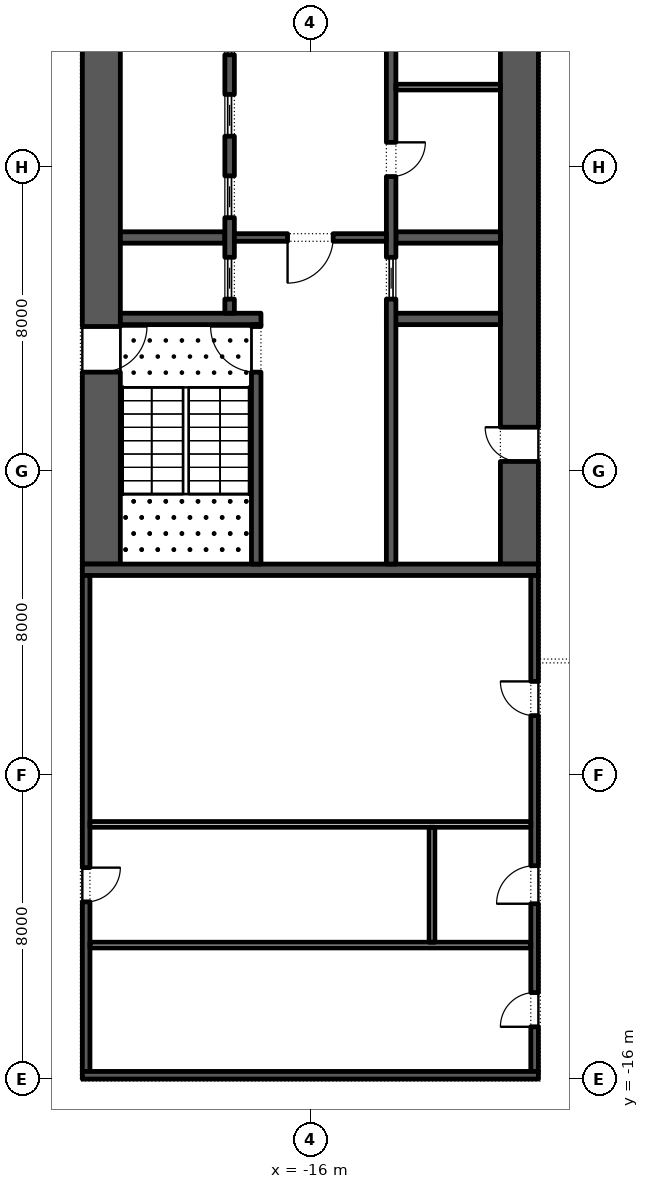
"""IFC4 building model, lengths in metres.
Left out: names, types, materials, properties, quantities, classifications, styles, units other than length and angle.
Written with IfcOpenShell. Run it as: python <this file> out.ifc"""

import sys

from ifc_helpers import new_model, si_unit, direction, frame, frame_2d, origin, place, context, subcontext, project, spatial, rectangle, extrude, element, fill, save


model = new_model("IFC4")
c1 = context("Model", 3, precision=1e-05, world=origin(), true_north=direction((0.0, 1.0)))
c2 = subcontext(c1, "Body", "Model", "MODEL_VIEW")
j1 = project(units=[si_unit("LENGTHUNIT", "METRE"), si_unit("PLANEANGLEUNIT", "RADIAN")], contexts=[c1])
p1 = place(None, origin())
s1 = spatial("IfcSite", under=j1, at=p1, CompositionType="ELEMENT")
p2 = place(p1, origin())
s2 = spatial("IfcBuilding", under=s1, at=p2, CompositionType="ELEMENT")
p3 = place(p2, frame((0.0, 0.0, 33.6)))
s3 = spatial("IfcBuildingStorey", under=s2, at=p3, CompositionType="ELEMENT", Elevation=33.6)
p4 = place(p3, frame((-21.5, -2.45, 0.0), z_axis=(0.0, 0.0, 1.0), x_axis=(0.0, 1.0, 0.0)))
e1 = element("IfcWall", 1, at=p4, inside=s3, PredefinedType="SHEAR", context=c2, shape_type="SweptSolid", body=[
    extrude(rectangle(XDim=27.9, YDim=1.0, at=frame_2d((13.95, 0.0))), origin(), (0.0, 0.0, 1.0), 5.8),
])
p5 = place(p4, frame((5.05, 0.0, 0.0)))
e2 = element("IfcOpeningElement", 2, at=p5, cuts=e1, PredefinedType="OPENING", context=c2, shape_type="SweptSolid", body=[
    extrude(rectangle(XDim=1.2, YDim=2.1, at=frame_2d((0.6, 1.05))), frame((0.0, 0.51, 0.0), z_axis=(0.0, -1.0, 0.0), x_axis=(1.0, 0.0, 0.0)), (0.0, 0.0, 1.0), 1.02),
])
p6 = place(p4, frame((21.65, 0.0, 0.0)))
e3 = element("IfcOpeningElement", 3, at=p6, cuts=e1, PredefinedType="OPENING", context=c2, shape_type="SweptSolid", body=[
    extrude(rectangle(XDim=1.2, YDim=2.1, at=frame_2d((0.6, 1.05))), frame((0.0, 0.51, 0.0), z_axis=(0.0, -1.0, 0.0), x_axis=(1.0, 0.0, 0.0)), (0.0, 0.0, 1.0), 1.02),
])
p7 = place(p3, frame((-10.5, -2.45, 0.0), z_axis=(0.0, 0.0, 1.0), x_axis=(0.0, 1.0, 0.0)))
e4 = element("IfcWall", 4, at=p7, inside=s3, PredefinedType="SHEAR", context=c2, shape_type="SweptSolid", body=[
    extrude(rectangle(XDim=27.9, YDim=1.0, at=frame_2d((13.95, 0.0))), origin(), (0.0, 0.0, 1.0), 5.8),
])
p8 = place(p7, frame((23.65, 0.0, 0.0)))
e5 = element("IfcOpeningElement", 5, at=p8, cuts=e4, PredefinedType="OPENING", context=c2, shape_type="SweptSolid", body=[
    extrude(rectangle(XDim=2.4, YDim=2.1, at=frame_2d((1.2, 1.05))), frame((0.0, 0.51, 0.0), z_axis=(0.0, -1.0, 0.0), x_axis=(1.0, 0.0, 0.0)), (0.0, 0.0, 1.0), 1.02),
])
p9 = place(p7, frame((2.7, 0.0, 0.0)))
e6 = element("IfcOpeningElement", 6, at=p9, cuts=e4, PredefinedType="OPENING", context=c2, shape_type="SweptSolid", body=[
    extrude(rectangle(XDim=0.9, YDim=2.1, at=frame_2d((0.45, 1.05))), frame((0.0, 0.51, 0.0), z_axis=(0.0, -1.0, 0.0), x_axis=(1.0, 0.0, 0.0)), (0.0, 0.0, 1.0), 1.02),
])
p10 = place(p3, frame((-22.0, -2.6, 0.0), z_axis=(0.0, 0.0, 1.0), x_axis=(1.0, 0.0, 0.0)))
e7 = element("IfcWall", 7, at=p10, inside=s3, PredefinedType="SHEAR", context=c2, shape_type="SweptSolid", body=[
    extrude(rectangle(XDim=12.0, YDim=0.3, at=frame_2d((6.0, 0.0))), origin(), (0.0, 0.0, 1.0), 5.8),
])
p11 = place(p3, frame((-21.0, 4.0, 0.0), z_axis=(0.0, 0.0, 1.0), x_axis=(1.0, 0.0, 0.0)))
e8 = element("IfcWall", 8, at=p11, inside=s3, PredefinedType="SHEAR", context=c2, shape_type="SweptSolid", body=[
    extrude(rectangle(XDim=3.7, YDim=0.3, at=frame_2d((1.85, 0.0))), origin(), (0.0, 0.0, 1.0), 5.8),
])
p12 = place(p3, frame((-17.425, -2.45, 0.0), z_axis=(0.0, 0.0, 1.0), x_axis=(0.0, 1.0, 0.0)))
e9 = element("IfcWall", 9, at=p12, inside=s3, PredefinedType="SHEAR", context=c2, shape_type="SweptSolid", body=[
    extrude(rectangle(XDim=6.3, YDim=0.25, at=frame_2d((3.15, 0.0))), origin(), (0.0, 0.0, 1.0), 5.8),
])
p13 = place(p12, frame((5.05, 0.0, 0.0)))
e10 = element("IfcOpeningElement", 10, at=p13, cuts=e9, PredefinedType="OPENING", context=c2, shape_type="SweptSolid", body=[
    extrude(rectangle(XDim=1.2, YDim=2.1, at=frame_2d((0.6, 1.05))), frame((0.0, 0.135, 0.0), z_axis=(0.0, -1.0, 0.0), x_axis=(1.0, 0.0, 0.0)), (0.0, 0.0, 1.0), 0.27),
])
p14 = place(p3, frame((-21.0, 6.143, 0.0), z_axis=(0.0, 0.0, 1.0), x_axis=(1.0, 0.0, 0.0)))
e11 = element("IfcWall", 11, at=p14, inside=s3, PredefinedType="SHEAR", context=c2, shape_type="SweptSolid", body=[
    extrude(rectangle(XDim=2.75, YDim=0.3, at=frame_2d((1.375, 0.0))), origin(), (0.0, 0.0, 1.0), 5.8),
])
p15 = place(p3, frame((-18.125, 4.15, 0.0), z_axis=(0.0, 0.0, 1.0), x_axis=(0.0, 1.0, 0.0)))
e12 = element("IfcWall", 12, at=p15, inside=s3, PredefinedType="SHEAR", context=c2, shape_type="SweptSolid", body=[
    extrude(rectangle(XDim=14.7, YDim=0.25, at=frame_2d((7.35, 0.0))), origin(), (0.0, 0.0, 1.0), 5.8),
])
p16 = place(p15, frame((0.371, 0.0, 0.0)))
e13 = element("IfcOpeningElement", 13, at=p16, cuts=e12, PredefinedType="OPENING", context=c2, shape_type="SweptSolid", body=[
    extrude(rectangle(XDim=1.1, YDim=2.1, at=frame_2d((0.55, 1.05))), frame((0.0, 0.135, 0.0), z_axis=(0.0, -1.0, 0.0), x_axis=(1.0, 0.0, 0.0)), (0.0, 0.0, 1.0), 0.27),
])
p17 = place(p15, frame((2.514, 0.0, 0.0)))
e14 = element("IfcOpeningElement", 14, at=p17, cuts=e12, PredefinedType="OPENING", context=c2, shape_type="SweptSolid", body=[
    extrude(rectangle(XDim=1.1, YDim=2.1, at=frame_2d((0.55, 1.05))), frame((0.0, 0.135, 0.0), z_axis=(0.0, -1.0, 0.0), x_axis=(1.0, 0.0, 0.0)), (0.0, 0.0, 1.0), 0.27),
])
p18 = place(p15, frame((4.657, 0.0, 0.0)))
e15 = element("IfcOpeningElement", 15, at=p18, cuts=e12, PredefinedType="OPENING", context=c2, shape_type="SweptSolid", body=[
    extrude(rectangle(XDim=1.1, YDim=2.1, at=frame_2d((0.55, 1.05))), frame((0.0, 0.135, 0.0), z_axis=(0.0, -1.0, 0.0), x_axis=(1.0, 0.0, 0.0)), (0.0, 0.0, 1.0), 0.27),
])
p19 = place(p15, frame((6.8, 0.0, 0.0)))
e16 = element("IfcOpeningElement", 16, at=p19, cuts=e12, PredefinedType="OPENING", context=c2, shape_type="SweptSolid", body=[
    extrude(rectangle(XDim=1.1, YDim=2.1, at=frame_2d((0.55, 1.05))), frame((0.0, 0.135, 0.0), z_axis=(0.0, -1.0, 0.0), x_axis=(1.0, 0.0, 0.0)), (0.0, 0.0, 1.0), 0.27),
])
p20 = place(p15, frame((8.943, 0.0, 0.0)))
e17 = element("IfcOpeningElement", 17, at=p20, cuts=e12, PredefinedType="OPENING", context=c2, shape_type="SweptSolid", body=[
    extrude(rectangle(XDim=1.1, YDim=2.1, at=frame_2d((0.55, 1.05))), frame((0.0, 0.135, 0.0), z_axis=(0.0, -1.0, 0.0), x_axis=(1.0, 0.0, 0.0)), (0.0, 0.0, 1.0), 0.27),
])
p21 = place(p15, frame((11.086, 0.0, 0.0)))
e18 = element("IfcOpeningElement", 18, at=p21, cuts=e12, PredefinedType="OPENING", context=c2, shape_type="SweptSolid", body=[
    extrude(rectangle(XDim=1.1, YDim=2.1, at=frame_2d((0.55, 1.05))), frame((0.0, 0.135, 0.0), z_axis=(0.0, -1.0, 0.0), x_axis=(1.0, 0.0, 0.0)), (0.0, 0.0, 1.0), 0.27),
])
p22 = place(p15, frame((13.229, 0.0, 0.0)))
e19 = element("IfcOpeningElement", 19, at=p22, cuts=e12, PredefinedType="OPENING", context=c2, shape_type="SweptSolid", body=[
    extrude(rectangle(XDim=1.1, YDim=2.1, at=frame_2d((0.55, 1.05))), frame((0.0, 0.135, 0.0), z_axis=(0.0, -1.0, 0.0), x_axis=(1.0, 0.0, 0.0)), (0.0, 0.0, 1.0), 0.27),
])
p23 = place(p3, frame((-14.0, 4.0, 0.0), z_axis=(0.0, 0.0, 1.0), x_axis=(1.0, 0.0, 0.0)))
e20 = element("IfcWall", 20, at=p23, inside=s3, PredefinedType="SHEAR", context=c2, shape_type="SweptSolid", body=[
    extrude(rectangle(XDim=3.0, YDim=0.3, at=frame_2d((1.5, 0.0))), origin(), (0.0, 0.0, 1.0), 5.8),
])
p24 = place(p3, frame((-13.75, 6.143, 0.0), z_axis=(0.0, 0.0, 1.0), x_axis=(1.0, 0.0, 0.0)))
e21 = element("IfcWall", 21, at=p24, inside=s3, PredefinedType="SHEAR", context=c2, shape_type="SweptSolid", body=[
    extrude(rectangle(XDim=2.75, YDim=0.3, at=frame_2d((1.375, 0.0))), origin(), (0.0, 0.0, 1.0), 5.8),
])
p25 = place(p3, frame((-13.875, -2.45, 0.0), z_axis=(0.0, 0.0, 1.0), x_axis=(0.0, 1.0, 0.0)))
e22 = element("IfcWall", 22, at=p25, inside=s3, PredefinedType="SHEAR", context=c2, shape_type="SweptSolid", body=[
    extrude(rectangle(XDim=21.3, YDim=0.25, at=frame_2d((10.65, 0.0))), origin(), (0.0, 0.0, 1.0), 5.8),
])
p26 = place(p25, frame((10.196, 0.0, 0.0)))
e23 = element("IfcOpeningElement", 23, at=p26, cuts=e22, PredefinedType="OPENING", context=c2, shape_type="SweptSolid", body=[
    extrude(rectangle(XDim=0.9, YDim=2.1, at=frame_2d((0.45, 1.05))), frame((0.0, 0.135, 0.0), z_axis=(0.0, -1.0, 0.0), x_axis=(1.0, 0.0, 0.0)), (0.0, 0.0, 1.0), 0.27),
])
p27 = place(p25, frame((16.475, 0.0, 0.0)))
e24 = element("IfcOpeningElement", 24, at=p27, cuts=e22, PredefinedType="OPENING", context=c2, shape_type="SweptSolid", body=[
    extrude(rectangle(XDim=0.9, YDim=2.1, at=frame_2d((0.45, 1.05))), frame((0.0, 0.135, 0.0), z_axis=(0.0, -1.0, 0.0), x_axis=(1.0, 0.0, 0.0)), (0.0, 0.0, 1.0), 0.27),
])
p28 = place(p25, frame((6.971, 0.0, 0.0)))
e25 = element("IfcOpeningElement", 25, at=p28, cuts=e22, PredefinedType="OPENING", context=c2, shape_type="SweptSolid", body=[
    extrude(rectangle(XDim=1.1, YDim=2.1, at=frame_2d((0.55, 1.05))), frame((0.0, 0.135, 0.0), z_axis=(0.0, -1.0, 0.0), x_axis=(1.0, 0.0, 0.0)), (0.0, 0.0, 1.0), 0.27),
])
p29 = place(p3, frame((-13.75, 10.1, 0.0), z_axis=(0.0, 0.0, 1.0), x_axis=(1.0, 0.0, 0.0)))
e26 = element("IfcWall", 26, at=p29, inside=s3, PredefinedType="PARTITIONING", context=c2, shape_type="SweptSolid", body=[
    extrude(rectangle(XDim=2.75, YDim=0.15, at=frame_2d((1.375, 0.0))), origin(), (0.0, 0.0, 1.0), 5.8),
])
p30 = place(p3, frame((-18.0, 6.143, 0.0), z_axis=(0.0, 0.0, 1.0), x_axis=(1.0, 0.0, 0.0)))
e27 = element("IfcWall", 27, at=p30, inside=s3, PredefinedType="SHEAR", context=c2, shape_type="SweptSolid", body=[
    extrude(rectangle(XDim=4.0, YDim=0.2, at=frame_2d((2.0, 0.0))), origin(), (0.0, 0.0, 1.0), 5.8),
])
p31 = place(p30, frame((1.4, 0.0, 0.0)))
e28 = element("IfcOpeningElement", 28, at=p31, cuts=e27, PredefinedType="OPENING", context=c2, shape_type="SweptSolid", body=[
    extrude(rectangle(XDim=1.2, YDim=2.1, at=frame_2d((0.6, 1.05))), frame((0.0, 0.11, 0.0), z_axis=(0.0, -1.0, 0.0), x_axis=(1.0, 0.0, 0.0)), (0.0, 0.0, 1.0), 0.22),
])
p32 = place(p3, frame((-21.9, -15.8, 0.0), z_axis=(0.0, 0.0, 1.0), x_axis=(0.0, 1.0, 0.0)))
e29 = element("IfcWall", 29, at=p32, inside=s3, PredefinedType="SHEAR", context=c2, shape_type="SweptSolid", body=[
    extrude(rectangle(XDim=13.05, YDim=0.2, at=frame_2d((6.525, 0.0))), origin(), (0.0, 0.0, 1.0), 5.8),
])
p33 = place(p32, frame((4.462, 0.0, 0.0)))
e30 = element("IfcOpeningElement", 30, at=p33, cuts=e29, PredefinedType="OPENING", context=c2, shape_type="SweptSolid", body=[
    extrude(rectangle(XDim=0.9, YDim=2.1, at=frame_2d((0.45, 1.05))), frame((0.0, 0.11, 0.0), z_axis=(0.0, -1.0, 0.0), x_axis=(1.0, 0.0, 0.0)), (0.0, 0.0, 1.0), 0.22),
])
p34 = place(p3, frame((-10.1, -15.8, 0.0), z_axis=(0.0, 0.0, 1.0), x_axis=(0.0, 1.0, 0.0)))
e31 = element("IfcWall", 31, at=p34, inside=s3, PredefinedType="SHEAR", context=c2, shape_type="SweptSolid", body=[
    extrude(rectangle(XDim=13.05, YDim=0.2, at=frame_2d((6.525, 0.0))), origin(), (0.0, 0.0, 1.0), 5.8),
])
p35 = place(p34, frame((1.175, 0.0, 0.0)))
e32 = element("IfcOpeningElement", 32, at=p35, cuts=e31, PredefinedType="OPENING", context=c2, shape_type="SweptSolid", body=[
    extrude(rectangle(XDim=0.9, YDim=2.1, at=frame_2d((0.45, 1.05))), frame((0.0, 0.11, 0.0), z_axis=(0.0, -1.0, 0.0), x_axis=(1.0, 0.0, 0.0)), (0.0, 0.0, 1.0), 0.22),
])
p36 = place(p34, frame((4.413, 0.0, 0.0)))
e33 = element("IfcOpeningElement", 33, at=p36, cuts=e31, PredefinedType="OPENING", context=c2, shape_type="SweptSolid", body=[
    extrude(rectangle(XDim=1.0, YDim=2.1, at=frame_2d((0.5, 1.05))), frame((0.0, 0.11, 0.0), z_axis=(0.0, -1.0, 0.0), x_axis=(1.0, 0.0, 0.0)), (0.0, 0.0, 1.0), 0.22),
])
p37 = place(p34, frame((9.363, 0.0, 0.0)))
e34 = element("IfcOpeningElement", 34, at=p37, cuts=e31, PredefinedType="OPENING", context=c2, shape_type="SweptSolid", body=[
    extrude(rectangle(XDim=0.9, YDim=2.1, at=frame_2d((0.45, 1.05))), frame((0.0, 0.11, 0.0), z_axis=(0.0, -1.0, 0.0), x_axis=(1.0, 0.0, 0.0)), (0.0, 0.0, 1.0), 0.22),
])
p38 = place(p3, frame((-22.0, -15.9, 0.0), z_axis=(0.0, 0.0, 1.0), x_axis=(1.0, 0.0, 0.0)))
e35 = element("IfcWall", 35, at=p38, inside=s3, PredefinedType="SHEAR", context=c2, shape_type="SweptSolid", body=[
    extrude(rectangle(XDim=12.0, YDim=0.2, at=frame_2d((6.0, 0.0))), origin(), (0.0, 0.0, 1.0), 5.8),
])
for number, where, z_axis, x_axis in (
    (36, (-21.8, -9.3, 0.0), (0.0, 0.0, 1.0), (1.0, 0.0, 0.0)),
    (37, (-21.8, -12.475, 0.0), (0.0, 0.0, 1.0), (1.0, 0.0, 0.0)),
):
    element("IfcWall", number, at=place(p3, frame(where, z_axis=z_axis, x_axis=x_axis)), inside=s3, PredefinedType="PARTITIONING", context=c2, shape_type="SweptSolid", body=[
        extrude(rectangle(XDim=11.6, YDim=0.15, at=frame_2d((5.8, 0.0))), origin(), (0.0, 0.0, 1.0), 5.8),
    ])
p39 = place(p3, frame((-12.8, -12.4, 0.0), z_axis=(0.0, 0.0, 1.0), x_axis=(0.0, 1.0, 0.0)))
e38 = element("IfcWall", 38, at=p39, inside=s3, PredefinedType="PARTITIONING", context=c2, shape_type="SweptSolid", body=[
    extrude(rectangle(XDim=3.025, YDim=0.15, at=frame_2d((1.512, 0.0))), origin(), (0.0, 0.0, 1.0), 5.8),
])
p40 = place(p16, origin())
e39 = element("IfcDoor", 39, at=p40, inside=s3, OperationType="SLIDING_TO_LEFT", PredefinedType="DOOR", context=c2, shape_type="SweptSolid", body=[
    extrude(rectangle(XDim=1.1, YDim=2.1, at=frame_2d((0.55, 1.05))), frame((0.0, 0.025, 0.0), z_axis=(0.0, -1.0, 0.0), x_axis=(1.0, 0.0, 0.0)), (0.0, 0.0, 1.0), 0.05),
])
fill(e13, e39)
p41 = place(p17, origin())
e40 = element("IfcDoor", 40, at=p41, inside=s3, OperationType="SLIDING_TO_LEFT", PredefinedType="DOOR", context=c2, shape_type="SweptSolid", body=[
    extrude(rectangle(XDim=1.1, YDim=2.1, at=frame_2d((0.55, 1.05))), frame((0.0, 0.025, 0.0), z_axis=(0.0, -1.0, 0.0), x_axis=(1.0, 0.0, 0.0)), (0.0, 0.0, 1.0), 0.05),
])
fill(e14, e40)
p42 = place(p18, origin())
e41 = element("IfcDoor", 41, at=p42, inside=s3, OperationType="SLIDING_TO_LEFT", PredefinedType="DOOR", context=c2, shape_type="SweptSolid", body=[
    extrude(rectangle(XDim=1.1, YDim=2.1, at=frame_2d((0.55, 1.05))), frame((0.0, 0.025, 0.0), z_axis=(0.0, -1.0, 0.0), x_axis=(1.0, 0.0, 0.0)), (0.0, 0.0, 1.0), 0.05),
])
fill(e15, e41)
p43 = place(p19, origin())
e42 = element("IfcDoor", 42, at=p43, inside=s3, OperationType="SLIDING_TO_LEFT", PredefinedType="DOOR", context=c2, shape_type="SweptSolid", body=[
    extrude(rectangle(XDim=1.1, YDim=2.1, at=frame_2d((0.55, 1.05))), frame((0.0, 0.025, 0.0), z_axis=(0.0, -1.0, 0.0), x_axis=(1.0, 0.0, 0.0)), (0.0, 0.0, 1.0), 0.05),
])
fill(e16, e42)
p44 = place(p26, frame((0.9, -0.2, 0.0), z_axis=(0.0, 0.0, 1.0), x_axis=(-1.0, 0.0, 0.0)))
e43 = element("IfcDoor", 43, at=p44, inside=s3, OperationType="SINGLE_SWING_RIGHT", PredefinedType="DOOR", context=c2, shape_type="SweptSolid", body=[
    extrude(rectangle(XDim=0.9, YDim=2.1, at=frame_2d((0.45, 1.05))), frame((0.0, -0.075, 0.0), z_axis=(0.0, -1.0, 0.0), x_axis=(1.0, 0.0, 0.0)), (0.0, 0.0, 1.0), 0.05),
])
fill(e23, e43)
p45 = place(p28, origin())
e44 = element("IfcDoor", 44, at=p45, inside=s3, OperationType="SLIDING_TO_LEFT", PredefinedType="DOOR", context=c2, shape_type="SweptSolid", body=[
    extrude(rectangle(XDim=1.1, YDim=2.1, at=frame_2d((0.55, 1.05))), frame((0.0, 0.025, 0.0), z_axis=(0.0, -1.0, 0.0), x_axis=(1.0, 0.0, 0.0)), (0.0, 0.0, 1.0), 0.05),
])
fill(e25, e44)
p46 = place(p31, frame((1.2, 0.0, 0.0), z_axis=(0.0, 0.0, 1.0), x_axis=(-1.0, 0.0, 0.0)))
e45 = element("IfcDoor", 45, at=p46, inside=s3, OperationType="SINGLE_SWING_LEFT", PredefinedType="DOOR", context=c2, shape_type="SweptSolid", body=[
    extrude(rectangle(XDim=1.2, YDim=2.1, at=frame_2d((0.6, 1.05))), frame((0.0, 0.025, 0.0), z_axis=(0.0, -1.0, 0.0), x_axis=(1.0, 0.0, 0.0)), (0.0, 0.0, 1.0), 0.05),
])
fill(e28, e45)
p47 = place(p13, origin())
e46 = element("IfcDoor", 46, at=p47, inside=s3, OperationType="SINGLE_SWING_LEFT", PredefinedType="DOOR", context=c2, shape_type="SweptSolid", body=[
    extrude(rectangle(XDim=1.2, YDim=2.1, at=frame_2d((0.6, 1.05))), frame((0.0, 0.025, 0.0), z_axis=(0.0, -1.0, 0.0), x_axis=(1.0, 0.0, 0.0)), (0.0, 0.0, 1.0), 0.05),
])
fill(e10, e46)
p48 = place(p5, frame((1.2, 0.0, 0.0), z_axis=(0.0, 0.0, 1.0), x_axis=(-1.0, 0.0, 0.0)))
e47 = element("IfcDoor", 47, at=p48, inside=s3, OperationType="SINGLE_SWING_RIGHT", PredefinedType="DOOR", context=c2, shape_type="SweptSolid", body=[
    extrude(rectangle(XDim=1.2, YDim=2.1, at=frame_2d((0.6, 1.05))), frame((0.0, 0.025, 0.0), z_axis=(0.0, -1.0, 0.0), x_axis=(1.0, 0.0, 0.0)), (0.0, 0.0, 1.0), 0.05),
])
fill(e2, e47)
p49 = place(p9, origin())
e48 = element("IfcDoor", 48, at=p49, inside=s3, OperationType="SINGLE_SWING_LEFT", PredefinedType="DOOR", context=c2, shape_type="SweptSolid", body=[
    extrude(rectangle(XDim=0.9, YDim=2.1, at=frame_2d((0.45, 1.05))), frame((0.0, 0.5, 0.0), z_axis=(0.0, -1.0, 0.0), x_axis=(1.0, 0.0, 0.0)), (0.0, 0.0, 1.0), 0.05),
])
fill(e6, e48)
p50 = place(p35, origin())
e49 = element("IfcDoor", 49, at=p50, inside=s3, OperationType="SINGLE_SWING_RIGHT", PredefinedType="DOOR", context=c2, shape_type="SweptSolid", body=[
    extrude(rectangle(XDim=0.9, YDim=2.1, at=frame_2d((0.45, 1.05))), frame((0.0, 0.1, 0.0), z_axis=(0.0, -1.0, 0.0), x_axis=(1.0, 0.0, 0.0)), (0.0, 0.0, 1.0), 0.05),
])
fill(e32, e49)
p51 = place(p36, origin())
e50 = element("IfcDoor", 50, at=p51, inside=s3, OperationType="SINGLE_SWING_RIGHT", PredefinedType="DOOR", context=c2, shape_type="SweptSolid", body=[
    extrude(rectangle(XDim=1.0, YDim=2.1, at=frame_2d((0.5, 1.05))), frame((0.0, 0.1, 0.0), z_axis=(0.0, -1.0, 0.0), x_axis=(1.0, 0.0, 0.0)), (0.0, 0.0, 1.0), 0.05),
])
fill(e33, e50)
p52 = place(p33, frame((0.9, -0.15, 0.0), z_axis=(0.0, 0.0, 1.0), x_axis=(-1.0, 0.0, 0.0)))
e51 = element("IfcDoor", 51, at=p52, inside=s3, OperationType="SINGLE_SWING_RIGHT", PredefinedType="DOOR", context=c2, shape_type="SweptSolid", body=[
    extrude(rectangle(XDim=0.9, YDim=2.1, at=frame_2d((0.45, 1.05))), frame((0.0, -0.05, 0.0), z_axis=(0.0, -1.0, 0.0), x_axis=(1.0, 0.0, 0.0)), (0.0, 0.0, 1.0), 0.05),
])
fill(e30, e51)
p53 = place(p37, origin())
e52 = element("IfcDoor", 52, at=p53, inside=s3, OperationType="SINGLE_SWING_LEFT", PredefinedType="DOOR", context=c2, shape_type="SweptSolid", body=[
    extrude(rectangle(XDim=0.9, YDim=2.1, at=frame_2d((0.45, 1.05))), frame((0.0, 0.1, 0.0), z_axis=(0.0, -1.0, 0.0), x_axis=(1.0, 0.0, 0.0)), (0.0, 0.0, 1.0), 0.05),
])
fill(e34, e52)
save(model, sys.argv[1])
